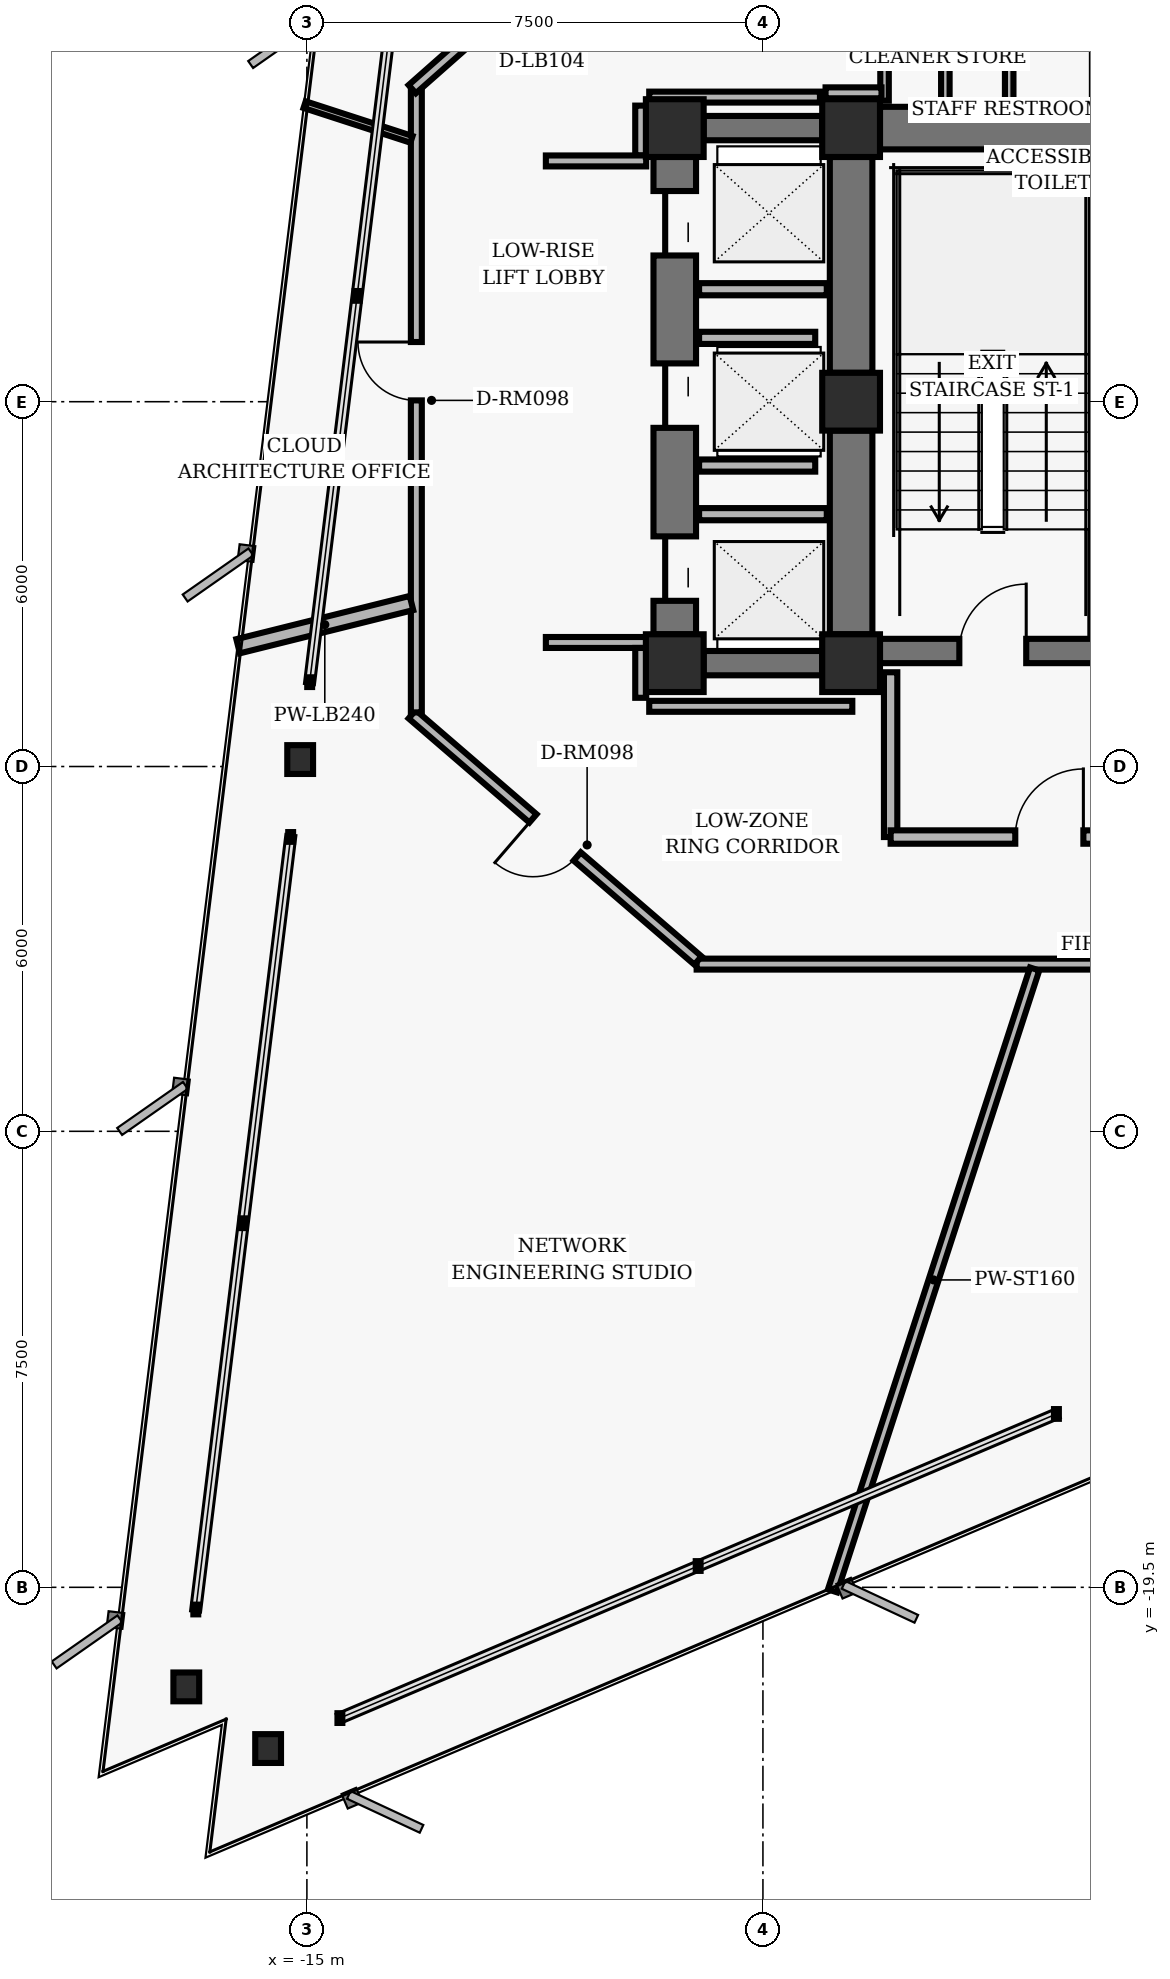
"""IFC4 building model, lengths in metres.
Left out: names, types, materials, properties, quantities, classifications, styles, units other than length and angle.
Written with IfcOpenShell. Run it as: python <this file> out.ifc"""

import sys

from ifc_helpers import new_model, si_unit, direction, frame, frame_2d, origin, origin_2d, place, context, subcontext, project, spatial, rectangle, hollow_rectangle, i_section, extrude, element, fill, save


model = new_model("IFC4")
c1 = context("Model", 3, precision=1e-05, world=origin(), true_north=direction((0.0, 1.0)))
c2 = subcontext(c1, "Body", "Model", "MODEL_VIEW")
j1 = project(units=[si_unit("LENGTHUNIT", "METRE"), si_unit("PLANEANGLEUNIT", "RADIAN")], contexts=[c1])
p1 = place(None, origin())
s1 = spatial("IfcSite", under=j1, at=p1, CompositionType="ELEMENT")
p2 = place(p1, origin())
s2 = spatial("IfcBuilding", under=s1, at=p2, CompositionType="ELEMENT")
p3 = place(p2, frame((0.0, 0.0, 49.6)))
s3 = spatial("IfcBuildingStorey", under=s2, at=p3, CompositionType="ELEMENT", Elevation=49.6)
for number, where, z_axis, x_axis in (
    (1, (-6.05, 4.5, 0.0), (0.0, 0.0, 1.0), (1.0, 0.0, 0.0)),
    (2, (-6.05, 0.0, 0.0), (0.0, 0.0, 1.0), (1.0, 0.0, 0.0)),
    (3, (-6.05, -4.3, 0.0), (0.0, 0.0, 1.0), (1.0, 0.0, 0.0)),
    (4, (-8.95, 4.5, 0.0), (0.0, 0.0, 1.0), (1.0, 0.0, 0.0)),
    (5, (-8.95, -4.3, 0.0), (0.0, 0.0, 1.0), (1.0, 0.0, 0.0)),
):
    element("IfcColumn", number, at=place(p3, frame(where, z_axis=z_axis, x_axis=x_axis)), inside=s3, PredefinedType="COLUMN", context=c2, shape_type="SweptSolid", body=[
        extrude(hollow_rectangle(XDim=0.95, YDim=0.95, WallThickness=0.06, InnerFilletRadius=0.02, OuterFilletRadius=0.04, at=origin_2d()), origin(), (0.0, 0.0, 1.0), 3.36),
    ])
p4 = place(p3, frame((-6.05, 0.475, 0.0), z_axis=(0.0, 0.0, 1.0), x_axis=(0.0, 1.0, 0.0)))
e6 = element("IfcWall", 6, at=p4, inside=s3, PredefinedType="SHEAR", context=c2, shape_type="SweptSolid", body=[
    extrude(rectangle(XDim=3.55, YDim=0.7, at=frame_2d((1.775, 0.0))), origin(), (0.0, 0.0, 1.0), 3.098),
])
p5 = place(p3, frame((-6.05, -3.825, 0.0), z_axis=(0.0, 0.0, 1.0), x_axis=(0.0, 1.0, 0.0)))
e7 = element("IfcWall", 7, at=p5, inside=s3, PredefinedType="SHEAR", context=c2, shape_type="SweptSolid", body=[
    extrude(rectangle(XDim=3.35, YDim=0.7, at=frame_2d((1.675, 0.0))), origin(), (0.0, 0.0, 1.0), 3.098),
])
p6 = place(p3, frame((-5.575, -4.1, 0.0), z_axis=(0.0, 0.0, 1.0), x_axis=(1.0, 0.0, 0.0)))
e8 = element("IfcWall", 8, at=p6, inside=s3, PredefinedType="SHEAR", context=c2, shape_type="SweptSolid", body=[
    extrude(rectangle(XDim=11.15, YDim=0.4, at=frame_2d((5.575, 0.0))), origin(), (0.0, 0.0, 1.0), 3.098),
])
p7 = place(p6, frame((1.305, 0.0, 0.0)))
e9 = element("IfcOpeningElement", 9, at=p7, cuts=e8, PredefinedType="OPENING", context=c2, shape_type="SweptSolid", body=[
    extrude(rectangle(XDim=1.1, YDim=2.04, at=frame_2d((0.55, 1.02))), frame((0.0, 0.21, 0.0), z_axis=(0.0, -1.0, 0.0), x_axis=(1.0, 0.0, 0.0)), (0.0, 0.0, 1.0), 0.42),
])
p8 = place(p6, frame((8.745, 0.0, 0.0)))
e10 = element("IfcOpeningElement", 10, at=p8, cuts=e8, PredefinedType="OPENING", context=c2, shape_type="SweptSolid", body=[
    extrude(rectangle(XDim=1.1, YDim=2.04, at=frame_2d((0.55, 1.02))), frame((0.0, 0.21, 0.0), z_axis=(0.0, -1.0, 0.0), x_axis=(1.0, 0.0, 0.0)), (0.0, 0.0, 1.0), 0.42),
])
p9 = place(p6, frame((4.045, 0.0, 0.0)))
e11 = element("IfcOpeningElement", 11, at=p9, cuts=e8, PredefinedType="OPENING", context=c2, shape_type="SweptSolid", body=[
    extrude(rectangle(XDim=1.06, YDim=2.04, at=frame_2d((0.53, 1.02))), frame((0.0, 0.21, 0.0), z_axis=(0.0, -1.0, 0.0), x_axis=(1.0, 0.0, 0.0)), (0.0, 0.0, 1.0), 0.42),
])
p10 = place(p6, frame((6.045, 0.0, 0.0)))
e12 = element("IfcOpeningElement", 12, at=p10, cuts=e8, PredefinedType="OPENING", context=c2, shape_type="SweptSolid", body=[
    extrude(rectangle(XDim=1.06, YDim=2.04, at=frame_2d((0.53, 1.02))), frame((0.0, 0.21, 0.0), z_axis=(0.0, -1.0, 0.0), x_axis=(1.0, 0.0, 0.0)), (0.0, 0.0, 1.0), 0.42),
])
p11 = place(p3, frame((-5.575, 4.5, 0.0), z_axis=(0.0, 0.0, 1.0), x_axis=(1.0, 0.0, 0.0)))
e13 = element("IfcWall", 13, at=p11, inside=s3, PredefinedType="SHEAR", context=c2, shape_type="SweptSolid", body=[
    extrude(rectangle(XDim=3.525, YDim=0.7, at=frame_2d((1.762, 0.0))), origin(), (0.0, 0.0, 1.0), 3.098),
])
p12 = place(p3, frame((-8.95, -3.825, 0.0), z_axis=(0.0, 0.0, 1.0), x_axis=(0.0, 1.0, 0.0)))
e14 = element("IfcWall", 14, at=p12, inside=s3, PredefinedType="SHEAR", context=c2, shape_type="SweptSolid", body=[
    extrude(rectangle(XDim=7.85, YDim=0.7, at=frame_2d((3.925, 0.0))), origin(), (0.0, 0.0, 1.0), 3.098),
])
p13 = place(p12, frame((0.55, 0.0, 0.0)))
e15 = element("IfcOpeningElement", 15, at=p13, cuts=e14, PredefinedType="OPENING", context=c2, shape_type="SweptSolid", body=[
    extrude(rectangle(XDim=1.06, YDim=2.04, at=frame_2d((0.53, 1.02))), frame((0.0, 0.36, 0.0), z_axis=(0.0, -1.0, 0.0), x_axis=(1.0, 0.0, 0.0)), (0.0, 0.0, 1.0), 0.72),
])
p14 = place(p12, frame((3.395, 0.0, 0.0)))
e16 = element("IfcOpeningElement", 16, at=p14, cuts=e14, PredefinedType="OPENING", context=c2, shape_type="SweptSolid", body=[
    extrude(rectangle(XDim=1.06, YDim=2.04, at=frame_2d((0.53, 1.02))), frame((0.0, 0.36, 0.0), z_axis=(0.0, -1.0, 0.0), x_axis=(1.0, 0.0, 0.0)), (0.0, 0.0, 1.0), 0.72),
])
p15 = place(p12, frame((6.23, 0.0, 0.0)))
e17 = element("IfcOpeningElement", 17, at=p15, cuts=e14, PredefinedType="OPENING", context=c2, shape_type="SweptSolid", body=[
    extrude(rectangle(XDim=1.06, YDim=2.04, at=frame_2d((0.53, 1.02))), frame((0.0, 0.36, 0.0), z_axis=(0.0, -1.0, 0.0), x_axis=(1.0, 0.0, 0.0)), (0.0, 0.0, 1.0), 0.72),
])
for number, where, z_axis, x_axis in (
    (18, (-8.475, 4.5, 0.0), (0.0, 0.0, 1.0), (1.0, 0.0, 0.0)),
    (19, (-8.475, -4.3, 0.0), (0.0, 0.0, 1.0), (1.0, 0.0, 0.0)),
):
    element("IfcWall", number, at=place(p3, frame(where, z_axis=z_axis, x_axis=x_axis)), inside=s3, PredefinedType="SHEAR", context=c2, shape_type="SweptSolid", body=[
        extrude(rectangle(XDim=1.95, YDim=0.4, at=frame_2d((0.975, 0.0))), origin(), (0.0, 0.0, 1.0), 3.098),
    ])
for number, where, z_axis, x_axis in (
    (20, (-15.111, -5.886, 0.0), (0.0, 0.0, 1.0), (1.0, 0.0, 0.0)),
    (21, (-16.983, -21.138, 0.0), (0.0, 0.0, 1.0), (1.0, 0.0, 0.0)),
    (22, (-15.638, -22.152, 0.0), (0.0, 0.0, 1.0), (1.0, 0.0, 0.0)),
):
    element("IfcColumn", number, at=place(p3, frame(where, z_axis=z_axis, x_axis=x_axis)), inside=s3, PredefinedType="COLUMN", context=c2, shape_type="SweptSolid", body=[
        extrude(i_section(OverallWidth=0.424, OverallDepth=0.474, WebThickness=0.048, FlangeThickness=0.077, FilletRadius=0.025, at=origin_2d()), origin(), (0.0, 0.0, 1.0), 3.36),
    ])
p16 = place(p3, frame((-5.4, -7.16, 0.0), z_axis=(0.0, 0.0, 1.0), x_axis=(0.0, 1.0, 0.0)))
e23 = element("IfcWall", 23, at=p16, inside=s3, PredefinedType="PARTITIONING", context=c2, shape_type="SweptSolid", body=[
    extrude(rectangle(XDim=2.71, YDim=0.22, at=frame_2d((1.355, 0.0))), origin(), (0.0, 0.0, 1.0), 3.073),
])
p17 = place(p3, frame((-5.4, -7.16, 0.0), z_axis=(0.0, 0.0, 1.0), x_axis=(1.0, 0.0, 0.0)))
e24 = element("IfcWall", 24, at=p17, inside=s3, PredefinedType="PARTITIONING", context=c2, shape_type="SweptSolid", body=[
    extrude(rectangle(XDim=5.4, YDim=0.22, at=frame_2d((2.7, 0.0))), origin(), (0.0, 0.0, 1.0), 2.587),
])
p18 = place(p17, frame((2.05, 0.0, 0.0)))
e25 = element("IfcOpeningElement", 25, at=p18, cuts=e24, PredefinedType="OPENING", context=c2, shape_type="SweptSolid", body=[
    extrude(rectangle(XDim=1.12, YDim=2.02, at=frame_2d((0.56, 1.01))), frame((0.0, 0.12, 0.0), z_axis=(0.0, -1.0, 0.0), x_axis=(1.0, 0.0, 0.0)), (0.0, 0.0, 1.0), 0.24),
])
for number, where, z_axis, x_axis in (
    (26, (-5.5, 4.95, 0.0), (0.0, 0.0, 1.0), (0.0, 1.0, 0.0)),
    (27, (-4.5, 4.95, 0.0), (0.0, 0.0, 1.0), (0.0, 1.0, 0.0)),
    (28, (-3.45, 4.95, 0.0), (0.0, 0.0, 1.0), (0.0, 1.0, 0.0)),
):
    element("IfcWall", number, at=place(p3, frame(where, z_axis=z_axis, x_axis=x_axis)), inside=s3, PredefinedType="PARTITIONING", context=c2, shape_type="SweptSolid", body=[
        extrude(rectangle(XDim=2.1, YDim=0.14, at=frame_2d((1.05, 0.0))), origin(), (0.0, 0.0, 1.0), 3.073),
    ])
for number, where, z_axis, x_axis in (
    (29, (-8.55, -1.85, 0.0), (0.0, 0.0, 1.0), (1.0, 0.0, 0.0)),
    (30, (-8.55, 1.85, 0.0), (0.0, 0.0, 1.0), (1.0, 0.0, 0.0)),
):
    element("IfcWall", number, at=place(p3, frame(where, z_axis=z_axis, x_axis=x_axis)), inside=s3, PredefinedType="PARTITIONING", context=c2, shape_type="SweptSolid", body=[
        extrude(rectangle(XDim=2.1, YDim=0.2, at=frame_2d((1.05, 0.0))), origin(), (0.0, 0.0, 1.0), 3.073),
    ])
for number, where, z_axis, x_axis in (
    (31, (-8.55, -1.05, 0.0), (0.0, 0.0, 1.0), (1.0, 0.0, 0.0)),
    (32, (-8.55, 1.05, 0.0), (0.0, 0.0, 1.0), (1.0, 0.0, 0.0)),
):
    element("IfcWall", number, at=place(p3, frame(where, z_axis=z_axis, x_axis=x_axis)), inside=s3, PredefinedType="PARTITIONING", context=c2, shape_type="SweptSolid", body=[
        extrude(rectangle(XDim=1.91, YDim=0.2, at=frame_2d((0.955, 0.0))), origin(), (0.0, 0.0, 1.0), 3.073),
    ])
p19 = place(p3, frame((8.41, -9.25, 0.0), z_axis=(0.0, 0.0, 1.0), x_axis=(-1.0, 0.0, 0.0)))
e33 = element("IfcWall", 33, at=p19, inside=s3, PredefinedType="PARTITIONING", context=c2, shape_type="SweptSolid", body=[
    extrude(rectangle(XDim=17.0, YDim=0.18, at=frame_2d((8.5, 0.0))), origin(), (0.0, 0.0, 1.0), 2.587),
])
p20 = place(p19, frame((5.34, 0.0, 0.0)))
e34 = element("IfcOpeningElement", 34, at=p20, cuts=e33, PredefinedType="OPENING", context=c2, shape_type="SweptSolid", body=[
    extrude(rectangle(XDim=1.02, YDim=2.02, at=frame_2d((0.51, 1.01))), frame((0.0, 0.1, 0.0), z_axis=(0.0, -1.0, 0.0), x_axis=(1.0, 0.0, 0.0)), (0.0, 0.0, 1.0), 0.2),
])
p21 = place(p3, frame((-8.568, -9.191, 0.0), z_axis=(0.0, 0.0, 1.0), x_axis=(-0.757556899173, 0.652769135694, 0.0)))
e35 = element("IfcWall", 35, at=p21, inside=s3, PredefinedType="PARTITIONING", context=c2, shape_type="SweptSolid", body=[
    extrude(rectangle(XDim=6.204, YDim=0.18, at=frame_2d((3.102, 0.0))), origin(), (0.0, 0.0, 1.0), 3.073),
])
p22 = place(p21, frame((2.622, 0.0, 0.0)))
e36 = element("IfcOpeningElement", 36, at=p22, cuts=e35, PredefinedType="OPENING", context=c2, shape_type="SweptSolid", body=[
    extrude(rectangle(XDim=0.96, YDim=2.02, at=frame_2d((0.48, 1.01))), frame((0.0, 0.1, 0.0), z_axis=(0.0, -1.0, 0.0), x_axis=(1.0, 0.0, 0.0)), (0.0, 0.0, 1.0), 0.2),
])
p23 = place(p3, frame((-13.2, -5.11, 0.0), z_axis=(0.0, 0.0, 1.0), x_axis=(0.0, 1.0, 0.0)))
e37 = element("IfcWall", 37, at=p23, inside=s3, PredefinedType="PARTITIONING", context=c2, shape_type="SweptSolid", body=[
    extrude(rectangle(XDim=10.22, YDim=0.18, at=frame_2d((5.11, 0.0))), origin(), (0.0, 0.0, 1.0), 2.587),
])
p24 = place(p23, frame((5.132, 0.0, 0.0)))
e38 = element("IfcOpeningElement", 38, at=p24, cuts=e37, PredefinedType="OPENING", context=c2, shape_type="SweptSolid", body=[
    extrude(rectangle(XDim=0.96, YDim=2.02, at=frame_2d((0.48, 1.01))), frame((0.0, 0.1, 0.0), z_axis=(0.0, -1.0, 0.0), x_axis=(1.0, 0.0, 0.0)), (0.0, 0.0, 1.0), 0.2),
])
p25 = place(p3, frame((-13.268, 5.14, 0.0), z_axis=(0.0, 0.0, 1.0), x_axis=(0.749626463267, 0.66186113768, 0.0)))
e39 = element("IfcWall", 39, at=p25, inside=s3, PredefinedType="PARTITIONING", context=c2, shape_type="SweptSolid", body=[
    extrude(rectangle(XDim=6.27, YDim=0.18, at=frame_2d((3.135, 0.0))), origin(), (0.0, 0.0, 1.0), 3.073),
])
p26 = place(p25, frame((2.625, 0.0, 0.0)))
e40 = element("IfcOpeningElement", 40, at=p26, cuts=e39, PredefinedType="OPENING", context=c2, shape_type="SweptSolid", body=[
    extrude(rectangle(XDim=1.02, YDim=2.02, at=frame_2d((0.51, 1.01))), frame((0.0, 0.1, 0.0), z_axis=(0.0, -1.0, 0.0), x_axis=(1.0, 0.0, 0.0)), (0.0, 0.0, 1.0), 0.2),
])
p27 = place(p3, frame((-9.51, 4.87, 0.0), z_axis=(0.0, 0.0, 1.0), x_axis=(0.0, -1.0, 0.0)))
e41 = element("IfcWall", 41, at=p27, inside=s3, PredefinedType="PARTITIONING", context=c2, shape_type="SweptSolid", body=[
    extrude(rectangle(XDim=0.82, YDim=0.18, at=frame_2d((0.41, 0.0))), origin(), (0.0, 0.0, 1.0), 3.073),
])
for number, where, z_axis, x_axis in (
    (42, (-9.42, 3.96, 0.0), (0.0, 0.0, 1.0), (-1.0, 0.0, 0.0)),
    (43, (-11.07, -3.96, 0.0), (0.0, 0.0, 1.0), (1.0, 0.0, 0.0)),
):
    element("IfcWall", number, at=place(p3, frame(where, z_axis=z_axis, x_axis=x_axis)), inside=s3, PredefinedType="PARTITIONING", context=c2, shape_type="SweptSolid", body=[
        extrude(rectangle(XDim=1.65, YDim=0.18, at=frame_2d((0.825, 0.0))), origin(), (0.0, 0.0, 1.0), 3.073),
    ])
p28 = place(p3, frame((-9.51, -4.05, 0.0), z_axis=(0.0, 0.0, 1.0), x_axis=(0.0, -1.0, 0.0)))
e44 = element("IfcWall", 44, at=p28, inside=s3, PredefinedType="PARTITIONING", context=c2, shape_type="SweptSolid", body=[
    extrude(rectangle(XDim=0.82, YDim=0.18, at=frame_2d((0.41, 0.0))), origin(), (0.0, 0.0, 1.0), 3.073),
])
p29 = place(p3, frame((-9.37, -5.01, 0.0), z_axis=(0.0, 0.0, 1.0), x_axis=(1.0, 0.0, 0.0)))
e45 = element("IfcWall", 45, at=p29, inside=s3, PredefinedType="PARTITIONING", context=c2, shape_type="SweptSolid", body=[
    extrude(rectangle(XDim=3.34, YDim=0.18, at=frame_2d((1.67, 0.0))), origin(), (0.0, 0.0, 1.0), 3.073),
])
p30 = place(p3, frame((-5.55, 5.08, 0.0), z_axis=(0.0, 0.0, 1.0), x_axis=(-1.0, 0.0, 0.0)))
e46 = element("IfcWall", 46, at=p30, inside=s3, PredefinedType="PARTITIONING", context=c2, shape_type="SweptSolid", body=[
    extrude(rectangle(XDim=0.92, YDim=0.18, at=frame_2d((0.46, 0.0))), origin(), (0.0, 0.0, 1.0), 3.073),
])
p31 = place(p3, frame((-6.562, 5.01, 0.0), z_axis=(0.0, 0.0, 1.0), x_axis=(-1.0, 0.0, 0.0)))
e47 = element("IfcWall", 47, at=p31, inside=s3, PredefinedType="PARTITIONING", context=c2, shape_type="SweptSolid", body=[
    extrude(rectangle(XDim=2.808, YDim=0.18, at=frame_2d((1.404, 0.0))), origin(), (0.0, 0.0, 1.0), 3.073),
])
p32 = place(p3, frame((-13.28, -3.311, 0.0), z_axis=(0.0, 0.0, 1.0), x_axis=(-0.970288946824, -0.241949084873, 0.0)))
e48 = element("IfcWall", 48, at=p32, inside=s3, PredefinedType="PARTITIONING", context=c2, shape_type="SweptSolid", body=[
    extrude(rectangle(XDim=2.938, YDim=0.24, at=frame_2d((1.469, 0.0))), origin(), (0.0, 0.0, 1.0), 3.073),
])
p33 = place(p3, frame((-3.031, -9.33, 0.0), z_axis=(0.0, 0.0, 1.0), x_axis=(-0.309020370084, -0.951055419454, 0.0)))
e49 = element("IfcWall", 49, at=p33, inside=s3, PredefinedType="PARTITIONING", context=c2, shape_type="SweptSolid", body=[
    extrude(rectangle(XDim=10.755, YDim=0.16, at=frame_2d((5.377, 0.0))), origin(), (0.0, 0.0, 1.0), 3.073),
])
p34 = place(p3, frame((-13.28, 4.315, 0.0), z_axis=(0.0, 0.0, 1.0), x_axis=(-0.951047661396, 0.309044245624, 0.0)))
e50 = element("IfcWall", 50, at=p34, inside=s3, PredefinedType="MOVABLE", context=c2, shape_type="SweptSolid", body=[
    extrude(rectangle(XDim=1.848, YDim=0.115, at=frame_2d((0.924, 0.0))), origin(), (0.0, 0.0, 1.0), 3.073),
])
p35 = place(p7, origin())
e51 = element("IfcDoor", 51, at=p35, inside=s3, OperationType="SINGLE_SWING_RIGHT", PredefinedType="DOOR", context=c2, shape_type="SweptSolid", body=[
    extrude(rectangle(XDim=1.1, YDim=2.04, at=frame_2d((0.55, 1.02))), frame((0.0, 0.025, 0.0), z_axis=(0.0, -1.0, 0.0), x_axis=(1.0, 0.0, 0.0)), (0.0, 0.0, 1.0), 0.05),
])
fill(e9, e51)
p36 = place(p18, origin())
e52 = element("IfcDoor", 52, at=p36, inside=s3, OperationType="SINGLE_SWING_RIGHT", PredefinedType="DOOR", context=c2, shape_type="SweptSolid", body=[
    extrude(rectangle(XDim=1.12, YDim=2.02, at=frame_2d((0.56, 1.01))), frame((0.0, 0.025, 0.0), z_axis=(0.0, -1.0, 0.0), x_axis=(1.0, 0.0, 0.0)), (0.0, 0.0, 1.0), 0.05),
])
fill(e25, e52)
p37 = place(p13, origin())
e53 = element("IfcDoor", 53, at=p37, inside=s3, OperationType="SLIDING_TO_LEFT", PredefinedType="DOOR", context=c2, shape_type="SweptSolid", body=[
    extrude(rectangle(XDim=1.06, YDim=2.04, at=frame_2d((0.53, 1.02))), frame((0.0, 0.025, 0.0), z_axis=(0.0, -1.0, 0.0), x_axis=(1.0, 0.0, 0.0)), (0.0, 0.0, 1.0), 0.05),
])
fill(e15, e53)
p38 = place(p14, origin())
e54 = element("IfcDoor", 54, at=p38, inside=s3, OperationType="SLIDING_TO_RIGHT", PredefinedType="DOOR", context=c2, shape_type="SweptSolid", body=[
    extrude(rectangle(XDim=1.06, YDim=2.04, at=frame_2d((0.53, 1.02))), frame((0.0, 0.025, 0.0), z_axis=(0.0, -1.0, 0.0), x_axis=(1.0, 0.0, 0.0)), (0.0, 0.0, 1.0), 0.05),
])
fill(e16, e54)
p39 = place(p15, origin())
e55 = element("IfcDoor", 55, at=p39, inside=s3, OperationType="SLIDING_TO_LEFT", PredefinedType="DOOR", context=c2, shape_type="SweptSolid", body=[
    extrude(rectangle(XDim=1.06, YDim=2.04, at=frame_2d((0.53, 1.02))), frame((0.0, 0.025, 0.0), z_axis=(0.0, -1.0, 0.0), x_axis=(1.0, 0.0, 0.0)), (0.0, 0.0, 1.0), 0.05),
])
fill(e17, e55)
p40 = place(p22, origin())
e56 = element("IfcDoor", 56, at=p40, inside=s3, OperationType="SINGLE_SWING_RIGHT", PredefinedType="DOOR", context=c2, shape_type="SweptSolid", body=[
    extrude(rectangle(XDim=0.96, YDim=2.02, at=frame_2d((0.48, 1.01))), frame((0.0, 0.025, 0.0), z_axis=(0.0, -1.0, 0.0), x_axis=(1.0, 0.0, 0.0)), (0.0, 0.0, 1.0), 0.05),
])
fill(e36, e56)
p41 = place(p24, origin())
e57 = element("IfcDoor", 57, at=p41, inside=s3, OperationType="SINGLE_SWING_RIGHT", PredefinedType="DOOR", context=c2, shape_type="SweptSolid", body=[
    extrude(rectangle(XDim=0.96, YDim=2.02, at=frame_2d((0.48, 1.01))), frame((0.0, 0.025, 0.0), z_axis=(0.0, -1.0, 0.0), x_axis=(1.0, 0.0, 0.0)), (0.0, 0.0, 1.0), 0.05),
])
fill(e38, e57)
save(model, sys.argv[1])
